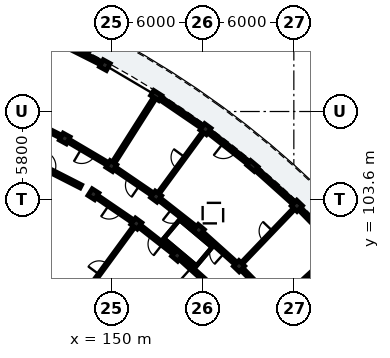
"""IFC4 building model, lengths in metres.
Left out: names, types, materials, properties, quantities, classifications, styles, units other than length and angle.
Written with IfcOpenShell. Run it as: python <this file> out.ifc"""

import sys

from ifc_helpers import new_model, si_unit, direction, frame, frame_2d, origin, origin_2d, place, context, subcontext, project, spatial, rectangle, extrude, element, fill, save


model = new_model("IFC4")
c1 = context("Model", 3, precision=1e-05, world=origin(), true_north=direction((0.0, 1.0)))
c2 = subcontext(c1, "Body", "Model", "MODEL_VIEW")
j1 = project(units=[si_unit("LENGTHUNIT", "METRE"), si_unit("PLANEANGLEUNIT", "RADIAN")], contexts=[c1])
p1 = place(None, origin())
s1 = spatial("IfcSite", under=j1, at=p1, CompositionType="ELEMENT")
p2 = place(p1, origin())
s2 = spatial("IfcBuilding", under=s1, at=p2, CompositionType="ELEMENT")
p3 = place(p2, frame((0.0, 0.0, 42.44)))
s3 = spatial("IfcBuildingStorey", under=s2, at=p3, CompositionType="ELEMENT", Elevation=42.44)
for number, where, z_axis, x_axis in (
    (1, (158.395, 99.226, 0.0), (0.0, 0.0, 1.0), (0.692, 0.722, 0.0)),
    (2, (162.2, 103.197, 0.0), (0.0, 0.0, 1.0), (0.692, 0.722, 0.0)),
    (3, (154.329, 99.919, 0.0), (0.0, 0.0, 1.0), (0.643, 0.766, 0.0)),
    (4, (155.743, 101.605, 0.0), (0.0, 0.0, 1.0), (0.643, 0.766, 0.0)),
):
    element("IfcColumn", number, at=place(p3, frame(where, z_axis=z_axis, x_axis=x_axis)), inside=s3, PredefinedType="COLUMN", context=c2, shape_type="SweptSolid", body=[
        extrude(rectangle(XDim=0.52, YDim=0.52, at=origin_2d()), origin(), (0.0, 0.0, 1.0), 3.1),
    ])
p4 = place(p3, frame((159.278, 105.818, 0.0), z_axis=(0.0, 0.0, 1.0), x_axis=(0.642787582947, 0.766044465556, 0.0)))
e5 = element("IfcColumn", 5, at=p4, inside=s3, PredefinedType="PILASTER", context=c2, shape_type="SweptSolid", body=[
    extrude(rectangle(XDim=0.39, YDim=0.63, at=origin_2d()), origin(), (0.0, 0.0, 1.0), 3.1),
])
for number, where, z_axis, x_axis in (
    (6, (151.639, 102.029, 0.0), (0.0, 0.0, 1.0), (0.591, 0.807, 0.0)),
    (7, (152.939, 103.804, 0.0), (0.0, 0.0, 1.0), (0.591, 0.807, 0.0)),
    (8, (156.189, 108.241, 0.0), (0.0, 0.0, 1.0), (0.591, 0.807, 0.0)),
    (9, (148.817, 103.957, 0.0), (0.0, 0.0, 1.0), (0.536, 0.844, 0.0)),
    (10, (149.997, 105.813, 0.0), (0.0, 0.0, 1.0), (0.536, 0.844, 0.0)),
):
    element("IfcColumn", number, at=place(p3, frame(where, z_axis=z_axis, x_axis=x_axis)), inside=s3, PredefinedType="COLUMN", context=c2, shape_type="SweptSolid", body=[
        extrude(rectangle(XDim=0.52, YDim=0.52, at=origin_2d()), origin(), (0.0, 0.0, 1.0), 3.1),
    ])
p5 = place(p3, frame((152.948, 110.455, 0.0), z_axis=(0.0, 0.0, 1.0), x_axis=(0.536481544469, 0.843912052553, 0.0)))
e11 = element("IfcColumn", 11, at=p5, inside=s3, PredefinedType="PILASTER", context=c2, shape_type="SweptSolid", body=[
    extrude(rectangle(XDim=0.39, YDim=0.63, at=origin_2d()), origin(), (0.0, 0.0, 1.0), 3.1),
])
for number, where, z_axis, x_axis in (
    (12, (146.928, 107.625, 0.0), (0.0, 0.0, 1.0), (0.48, 0.877, 0.0)),
    (13, (149.567, 112.451, 0.0), (0.0, 0.0, 1.0), (0.48, 0.877, 0.0)),
):
    element("IfcColumn", number, at=place(p3, frame(where, z_axis=z_axis, x_axis=x_axis)), inside=s3, PredefinedType="COLUMN", context=c2, shape_type="SweptSolid", body=[
        extrude(rectangle(XDim=0.52, YDim=0.52, at=origin_2d()), origin(), (0.0, 0.0, 1.0), 3.1),
    ])
p6 = place(p3, frame((164.829, 100.507, 0.0), z_axis=(0.0, 0.0, 1.0), x_axis=(-0.698865423919, 0.715253185418, 0.0)))
e14 = element("IfcWall", 14, at=p6, inside=s3, PredefinedType="SOLIDWALL", context=c2, shape_type="SweptSolid", body=[
    extrude(rectangle(XDim=3.531, YDim=0.22, at=frame_2d((1.765, 0.0))), origin(), (0.0, 0.0, 1.0), 2.355),
])
p7 = place(p6, frame((1.14, 0.0, 0.55)))
e15 = element("IfcOpeningElement", 15, at=p7, cuts=e14, PredefinedType="OPENING", context=c2, shape_type="SweptSolid", body=[
    extrude(rectangle(XDim=1.25, YDim=1.6, at=frame_2d((0.625, 0.8))), frame((0.0, 0.12, 0.0), z_axis=(0.0, -1.0, 0.0), x_axis=(1.0, 0.0, 0.0)), (0.0, 0.0, 1.0), 0.24),
])
p8 = place(p3, frame((162.029, 103.35, 0.0), z_axis=(0.0, 0.0, 1.0), x_axis=(-0.744441433528, 0.667687765386, 0.0)))
e16 = element("IfcWall", 16, at=p8, inside=s3, PredefinedType="SOLIDWALL", context=c2, shape_type="SweptSolid", body=[
    extrude(rectangle(XDim=3.531, YDim=0.22, at=frame_2d((1.765, 0.0))), origin(), (0.0, 0.0, 1.0), 2.355),
])
p9 = place(p8, frame((1.065, 0.0, 0.35)))
e17 = element("IfcOpeningElement", 17, at=p9, cuts=e16, PredefinedType="OPENING", context=c2, shape_type="SweptSolid", body=[
    extrude(rectangle(XDim=1.4, YDim=1.65, at=frame_2d((0.7, 0.825))), frame((0.0, 0.12, 0.0), z_axis=(0.0, -1.0, 0.0), x_axis=(1.0, 0.0, 0.0)), (0.0, 0.0, 1.0), 0.24),
])
p10 = place(p3, frame((159.148, 105.92, 0.0), z_axis=(0.0, 0.0, 1.0), x_axis=(-0.786809962682, 0.617195335873, 0.0)))
e18 = element("IfcWall", 18, at=p10, inside=s3, PredefinedType="SOLIDWALL", context=c2, shape_type="SweptSolid", body=[
    extrude(rectangle(XDim=3.531, YDim=0.22, at=frame_2d((1.765, 0.0))), origin(), (0.0, 0.0, 1.0), 2.355),
])
p11 = place(p10, frame((1.255, 0.0, 0.0)))
e19 = element("IfcOpeningElement", 19, at=p11, cuts=e18, PredefinedType="OPENING", context=c2, shape_type="SweptSolid", body=[
    extrude(rectangle(XDim=1.02, YDim=2.14, at=frame_2d((0.51, 1.07))), frame((0.0, 0.12, 0.0), z_axis=(0.0, -1.0, 0.0), x_axis=(1.0, 0.0, 0.0)), (0.0, 0.0, 1.0), 0.24),
])
p12 = place(p3, frame((155.999, 108.371, 0.0), z_axis=(0.0, 0.0, 1.0), x_axis=(-0.825785272096, 0.563984649072, 0.0)))
e20 = element("IfcWall", 20, at=p12, inside=s3, PredefinedType="SOLIDWALL", context=c2, shape_type="SweptSolid", body=[
    extrude(rectangle(XDim=3.531, YDim=0.22, at=frame_2d((1.765, 0.0))), origin(), (0.0, 0.0, 1.0), 2.355),
])
p13 = place(p12, frame((0.915, 0.0, 0.35)))
e21 = element("IfcOpeningElement", 21, at=p13, cuts=e20, PredefinedType="OPENING", context=c2, shape_type="SweptSolid", body=[
    extrude(rectangle(XDim=1.7, YDim=1.8, at=frame_2d((0.85, 0.9))), frame((0.0, 0.12, 0.0), z_axis=(0.0, -1.0, 0.0), x_axis=(1.0, 0.0, 0.0)), (0.0, 0.0, 1.0), 0.24),
])
p14 = place(p3, frame((149.362, 112.554, 0.0), z_axis=(0.0, 0.0, 1.0), x_axis=(-0.892747589921, 0.450557144755, 0.0)))
e22 = element("IfcWall", 22, at=p14, inside=s3, PredefinedType="SOLIDWALL", context=c2, shape_type="SweptSolid", body=[
    extrude(rectangle(XDim=3.531, YDim=0.22, at=frame_2d((1.765, 0.0))), origin(), (0.0, 0.0, 1.0), 2.355),
])
p15 = place(p14, frame((1.075, 0.0, 0.55)))
e23 = element("IfcOpeningElement", 23, at=p15, cuts=e22, PredefinedType="OPENING", context=c2, shape_type="SweptSolid", body=[
    extrude(rectangle(XDim=1.38, YDim=1.56, at=frame_2d((0.69, 0.78))), frame((0.0, 0.12, 0.0), z_axis=(0.0, -1.0, 0.0), x_axis=(1.0, 0.0, 0.0)), (0.0, 0.0, 1.0), 0.24),
])
p16 = place(p3, frame((143.625, 106.696, 0.0), z_axis=(0.0, 0.0, 1.0), x_axis=(0.891003372311, -0.453996685595, 0.0)))
e24 = element("IfcWall", 24, at=p16, inside=s3, PredefinedType="PARTITIONING", context=c2, shape_type="SweptSolid", body=[
    extrude(rectangle(XDim=4.9, YDim=0.22, at=frame_2d((2.45, 0.0))), origin(), (0.0, 0.0, 1.0), 2.34),
])
p17 = place(p16, frame((1.95, 0.0, 0.0)))
e25 = element("IfcOpeningElement", 25, at=p17, cuts=e24, PredefinedType="OPENING", context=c2, shape_type="SweptSolid", body=[
    extrude(rectangle(XDim=0.98, YDim=2.14, at=frame_2d((0.49, 1.07))), frame((0.0, 0.12, 0.0), z_axis=(0.0, -1.0, 0.0), x_axis=(1.0, 0.0, 0.0)), (0.0, 0.0, 1.0), 0.24),
])
p18 = place(p3, frame((161.18, 96.947, 0.0), z_axis=(0.0, 0.0, 1.0), x_axis=(0.737934199263, 0.674872667663, 0.0)))
e26 = element("IfcWall", 26, at=p18, inside=s3, PredefinedType="PARTITIONING", context=c2, shape_type="SweptSolid", body=[
    extrude(rectangle(XDim=4.7, YDim=0.185, at=frame_2d((2.35, 0.0))), origin(), (0.0, 0.0, 1.0), 2.37),
])
p19 = place(p3, frame((160.641, 96.927, 0.0), z_axis=(0.0, 0.0, 1.0), x_axis=(-0.698787219683, 0.715329589496, 0.0)))
e27 = element("IfcWall", 27, at=p19, inside=s3, PredefinedType="PARTITIONING", context=c2, shape_type="SweptSolid", body=[
    extrude(rectangle(XDim=2.863, YDim=0.205, at=frame_2d((1.432, 0.0))), origin(), (0.0, 0.0, 1.0), 2.37),
])
p20 = place(p19, frame((0.937, 0.0, 0.0)))
e28 = element("IfcOpeningElement", 28, at=p20, cuts=e27, PredefinedType="OPENING", context=c2, shape_type="SweptSolid", body=[
    extrude(rectangle(XDim=0.99, YDim=2.16, at=frame_2d((0.495, 1.08))), frame((0.0, 0.113, 0.0), z_axis=(0.0, -1.0, 0.0), x_axis=(1.0, 0.0, 0.0)), (0.0, 0.0, 1.0), 0.225),
])
p21 = place(p3, frame((158.672, 99.514, 0.0), z_axis=(0.0, 0.0, 1.0), x_axis=(0.691855720025, 0.722035776585, 0.0)))
e29 = element("IfcWall", 29, at=p21, inside=s3, PredefinedType="PARTITIONING", context=c2, shape_type="SweptSolid", body=[
    extrude(rectangle(XDim=4.7, YDim=0.125, at=frame_2d((2.35, 0.0))), origin(), (0.0, 0.0, 1.0), 2.37),
])
p22 = place(p21, frame((1.905, 0.0, 0.0)))
e30 = element("IfcOpeningElement", 30, at=p22, cuts=e29, PredefinedType="OPENING", context=c2, shape_type="SweptSolid", body=[
    extrude(rectangle(XDim=0.89, YDim=2.1, at=frame_2d((0.445, 1.05))), frame((0.0, 0.073, 0.0), z_axis=(0.0, -1.0, 0.0), x_axis=(1.0, 0.0, 0.0)), (0.0, 0.0, 1.0), 0.145),
])
p23 = place(p3, frame((158.135, 99.459, 0.0), z_axis=(0.0, 0.0, 1.0), x_axis=(-0.744433521088, 0.667696587291, 0.0)))
e31 = element("IfcWall", 31, at=p23, inside=s3, PredefinedType="PARTITIONING", context=c2, shape_type="SweptSolid", body=[
    extrude(rectangle(XDim=2.863, YDim=0.205, at=frame_2d((1.432, 0.0))), origin(), (0.0, 0.0, 1.0), 2.37),
])
p24 = place(p23, frame((0.947, 0.0, 0.0)))
e32 = element("IfcOpeningElement", 32, at=p24, cuts=e31, PredefinedType="OPENING", context=c2, shape_type="SweptSolid", body=[
    extrude(rectangle(XDim=0.97, YDim=2.15, at=frame_2d((0.485, 1.075))), frame((0.0, 0.113, 0.0), z_axis=(0.0, -1.0, 0.0), x_axis=(1.0, 0.0, 0.0)), (0.0, 0.0, 1.0), 0.225),
])
p25 = place(p3, frame((156.613, 97.871, 0.0), z_axis=(0.0, 0.0, 1.0), x_axis=(-0.744418559135, 0.667713268413, 0.0)))
e33 = element("IfcWall", 33, at=p25, inside=s3, PredefinedType="PARTITIONING", context=c2, shape_type="SweptSolid", body=[
    extrude(rectangle(XDim=2.718, YDim=0.205, at=frame_2d((1.359, 0.0))), origin(), (0.0, 0.0, 1.0), 2.37),
])
p26 = place(p25, frame((0.874, 0.0, 0.0)))
e34 = element("IfcOpeningElement", 34, at=p26, cuts=e33, PredefinedType="OPENING", context=c2, shape_type="SweptSolid", body=[
    extrude(rectangle(XDim=0.97, YDim=2.15, at=frame_2d((0.485, 1.075))), frame((0.0, 0.113, 0.0), z_axis=(0.0, -1.0, 0.0), x_axis=(1.0, 0.0, 0.0)), (0.0, 0.0, 1.0), 0.225),
])
p27 = place(p3, frame((155.467, 101.821, 0.0), z_axis=(0.0, 0.0, 1.0), x_axis=(-0.786806323554, 0.617199975061, 0.0)))
e35 = element("IfcWall", 35, at=p27, inside=s3, PredefinedType="PARTITIONING", context=c2, shape_type="SweptSolid", body=[
    extrude(rectangle(XDim=2.863, YDim=0.205, at=frame_2d((1.432, 0.0))), origin(), (0.0, 0.0, 1.0), 2.37),
])
p28 = place(p27, frame((0.957, 0.0, 0.0)))
e36 = element("IfcOpeningElement", 36, at=p28, cuts=e35, PredefinedType="OPENING", context=c2, shape_type="SweptSolid", body=[
    extrude(rectangle(XDim=0.95, YDim=2.13, at=frame_2d((0.475, 1.065))), frame((0.0, 0.113, 0.0), z_axis=(0.0, -1.0, 0.0), x_axis=(1.0, 0.0, 0.0)), (0.0, 0.0, 1.0), 0.225),
])
p29 = place(p3, frame((154.053, 100.135, 0.0), z_axis=(0.0, 0.0, 1.0), x_axis=(-0.786835457019, 0.617162833924, 0.0)))
e37 = element("IfcWall", 37, at=p29, inside=s3, PredefinedType="PARTITIONING", context=c2, shape_type="SweptSolid", body=[
    extrude(rectangle(XDim=2.718, YDim=0.205, at=frame_2d((1.359, 0.0))), origin(), (0.0, 0.0, 1.0), 2.37),
])
p30 = place(p29, frame((0.884, 0.0, 0.0)))
e38 = element("IfcOpeningElement", 38, at=p30, cuts=e37, PredefinedType="OPENING", context=c2, shape_type="SweptSolid", body=[
    extrude(rectangle(XDim=0.95, YDim=2.13, at=frame_2d((0.475, 1.065))), frame((0.0, 0.113, 0.0), z_axis=(0.0, -1.0, 0.0), x_axis=(1.0, 0.0, 0.0)), (0.0, 0.0, 1.0), 0.225),
])
p31 = place(p3, frame((153.176, 104.126, 0.0), z_axis=(0.0, 0.0, 1.0), x_axis=(0.590910940129, 0.806736797745, 0.0)))
e39 = element("IfcWall", 39, at=p31, inside=s3, PredefinedType="PARTITIONING", context=c2, shape_type="SweptSolid", body=[
    extrude(rectangle(XDim=4.7, YDim=0.125, at=frame_2d((2.35, 0.0))), origin(), (0.0, 0.0, 1.0), 2.37),
])
p32 = place(p31, frame((1.895, 0.0, 0.0)))
e40 = element("IfcOpeningElement", 40, at=p32, cuts=e39, PredefinedType="OPENING", context=c2, shape_type="SweptSolid", body=[
    extrude(rectangle(XDim=0.91, YDim=2.1, at=frame_2d((0.455, 1.05))), frame((0.0, 0.073, 0.0), z_axis=(0.0, -1.0, 0.0), x_axis=(1.0, 0.0, 0.0)), (0.0, 0.0, 1.0), 0.145),
])
p33 = place(p3, frame((147.503, 96.382, 0.0), z_axis=(0.0, 0.0, 1.0), x_axis=(0.590924179316, 0.806727100263, 0.0)))
e41 = element("IfcWall", 41, at=p33, inside=s3, PredefinedType="PARTITIONING", context=c2, shape_type="SweptSolid", body=[
    extrude(rectangle(XDim=6.6, YDim=0.125, at=frame_2d((3.3, 0.0))), origin(), (0.0, 0.0, 1.0), 2.37),
])
p34 = place(p33, frame((2.855, 0.0, 0.0)))
e42 = element("IfcOpeningElement", 42, at=p34, cuts=e41, PredefinedType="OPENING", context=c2, shape_type="SweptSolid", body=[
    extrude(rectangle(XDim=0.89, YDim=2.1, at=frame_2d((0.445, 1.05))), frame((0.0, 0.073, 0.0), z_axis=(0.0, -1.0, 0.0), x_axis=(1.0, 0.0, 0.0)), (0.0, 0.0, 1.0), 0.145),
])
p35 = place(p3, frame((152.65, 104.001, 0.0), z_axis=(0.0, 0.0, 1.0), x_axis=(-0.825779671787, 0.563992848947, 0.0)))
e43 = element("IfcWall", 43, at=p35, inside=s3, PredefinedType="PARTITIONING", context=c2, shape_type="SweptSolid", body=[
    extrude(rectangle(XDim=2.863, YDim=0.205, at=frame_2d((1.432, 0.0))), origin(), (0.0, 0.0, 1.0), 2.37),
])
p36 = place(p35, frame((0.967, 0.0, 0.0)))
e44 = element("IfcOpeningElement", 44, at=p36, cuts=e43, PredefinedType="OPENING", context=c2, shape_type="SweptSolid", body=[
    extrude(rectangle(XDim=0.93, YDim=2.12, at=frame_2d((0.465, 1.06))), frame((0.0, 0.113, 0.0), z_axis=(0.0, -1.0, 0.0), x_axis=(1.0, 0.0, 0.0)), (0.0, 0.0, 1.0), 0.225),
])
p37 = place(p3, frame((151.35, 102.226, 0.0), z_axis=(0.0, 0.0, 1.0), x_axis=(-0.825752009056, 0.56403334967, 0.0)))
e45 = element("IfcWall", 45, at=p37, inside=s3, PredefinedType="PARTITIONING", context=c2, shape_type="SweptSolid", body=[
    extrude(rectangle(XDim=2.718, YDim=0.205, at=frame_2d((1.359, 0.0))), origin(), (0.0, 0.0, 1.0), 2.37),
])
p38 = place(p37, frame((0.894, 0.0, 0.0)))
e46 = element("IfcOpeningElement", 46, at=p38, cuts=e45, PredefinedType="OPENING", context=c2, shape_type="SweptSolid", body=[
    extrude(rectangle(XDim=0.93, YDim=2.12, at=frame_2d((0.465, 1.06))), frame((0.0, 0.113, 0.0), z_axis=(0.0, -1.0, 0.0), x_axis=(1.0, 0.0, 0.0)), (0.0, 0.0, 1.0), 0.225),
])
p39 = place(p3, frame((150.211, 106.151, 0.0), z_axis=(0.0, 0.0, 1.0), x_axis=(0.536492262982, 0.843905238614, 0.0)))
e47 = element("IfcWall", 47, at=p39, inside=s3, PredefinedType="PARTITIONING", context=c2, shape_type="SweptSolid", body=[
    extrude(rectangle(XDim=4.7, YDim=0.185, at=frame_2d((2.35, 0.0))), origin(), (0.0, 0.0, 1.0), 2.37),
])
p40 = place(p3, frame((149.695, 105.991, 0.0), z_axis=(0.0, 0.0, 1.0), x_axis=(-0.861113214678, 0.508413248753, 0.0)))
e48 = element("IfcWall", 48, at=p40, inside=s3, PredefinedType="PARTITIONING", context=c2, shape_type="SweptSolid", body=[
    extrude(rectangle(XDim=2.863, YDim=0.205, at=frame_2d((1.432, 0.0))), origin(), (0.0, 0.0, 1.0), 2.37),
])
p41 = place(p40, frame((0.937, 0.0, 0.0)))
e49 = element("IfcOpeningElement", 49, at=p41, cuts=e48, PredefinedType="OPENING", context=c2, shape_type="SweptSolid", body=[
    extrude(rectangle(XDim=0.99, YDim=2.16, at=frame_2d((0.495, 1.08))), frame((0.0, 0.113, 0.0), z_axis=(0.0, -1.0, 0.0), x_axis=(1.0, 0.0, 0.0)), (0.0, 0.0, 1.0), 0.225),
])
p42 = place(p3, frame((146.616, 107.782, 0.0), z_axis=(0.0, 0.0, 1.0), x_axis=(-0.89273239336, 0.450587254419, 0.0)))
e50 = element("IfcWall", 50, at=p42, inside=s3, PredefinedType="PARTITIONING", context=c2, shape_type="SweptSolid", body=[
    extrude(rectangle(XDim=2.863, YDim=0.205, at=frame_2d((1.432, 0.0))), origin(), (0.0, 0.0, 1.0), 2.37),
])
p43 = place(p42, frame((0.947, 0.0, 0.0)))
e51 = element("IfcOpeningElement", 51, at=p43, cuts=e50, PredefinedType="OPENING", context=c2, shape_type="SweptSolid", body=[
    extrude(rectangle(XDim=0.97, YDim=2.15, at=frame_2d((0.485, 1.075))), frame((0.0, 0.113, 0.0), z_axis=(0.0, -1.0, 0.0), x_axis=(1.0, 0.0, 0.0)), (0.0, 0.0, 1.0), 0.225),
])
p44 = place(p9, origin())
e52 = element("IfcWindow", 52, at=p44, inside=s3, PartitioningType="SINGLE_PANEL", PredefinedType="WINDOW", context=c2, shape_type="SweptSolid", body=[
    extrude(rectangle(XDim=1.4, YDim=1.65, at=frame_2d((0.7, 0.825))), frame((0.0, 0.03, 0.0), z_axis=(0.0, -1.0, 0.0), x_axis=(1.0, 0.0, 0.0)), (0.0, 0.0, 1.0), 0.06),
])
fill(e17, e52)
p45 = place(p11, origin())
e53 = element("IfcDoor", 53, at=p45, inside=s3, OperationType="SINGLE_SWING_RIGHT", PredefinedType="DOOR", context=c2, shape_type="SweptSolid", body=[
    extrude(rectangle(XDim=1.02, YDim=2.14, at=frame_2d((0.51, 1.07))), frame((0.0, 0.025, 0.0), z_axis=(0.0, -1.0, 0.0), x_axis=(1.0, 0.0, 0.0)), (0.0, 0.0, 1.0), 0.05),
])
fill(e19, e53)
p46 = place(p13, origin())
e54 = element("IfcWindow", 54, at=p46, inside=s3, PartitioningType="SINGLE_PANEL", PredefinedType="WINDOW", context=c2, shape_type="SweptSolid", body=[
    extrude(rectangle(XDim=1.7, YDim=1.8, at=frame_2d((0.85, 0.9))), frame((0.0, 0.03, 0.0), z_axis=(0.0, -1.0, 0.0), x_axis=(1.0, 0.0, 0.0)), (0.0, 0.0, 1.0), 0.06),
])
fill(e21, e54)
p47 = place(p15, origin())
e55 = element("IfcWindow", 55, at=p47, inside=s3, PartitioningType="SINGLE_PANEL", PredefinedType="WINDOW", context=c2, shape_type="SweptSolid", body=[
    extrude(rectangle(XDim=1.38, YDim=1.56, at=frame_2d((0.69, 0.78))), frame((0.0, 0.03, 0.0), z_axis=(0.0, -1.0, 0.0), x_axis=(1.0, 0.0, 0.0)), (0.0, 0.0, 1.0), 0.06),
])
fill(e23, e55)
p48 = place(p2, frame((0.0, 0.0, 45.8)))
p49 = place(p48, frame((0.0, 0.0, -0.26)))
p50 = place(p49, frame((156.675, 102.716, 0.21)))
e56 = element("IfcWindow", 56, at=p50, inside=s3, PartitioningType="SINGLE_PANEL", PredefinedType="SKYLIGHT", context=c2, shape_type="SweptSolid", body=[
    extrude(rectangle(XDim=1.35, YDim=1.35, at=origin_2d()), origin(), (0.0, 0.0, 1.0), 0.05),
])
p51 = place(p17, origin())
e57 = element("IfcDoor", 57, at=p51, inside=s3, OperationType="SINGLE_SWING_LEFT", PredefinedType="DOOR", context=c2, shape_type="SweptSolid", body=[
    extrude(rectangle(XDim=0.98, YDim=2.14, at=frame_2d((0.49, 1.07))), frame((0.0, 0.025, 0.0), z_axis=(0.0, -1.0, 0.0), x_axis=(1.0, 0.0, 0.0)), (0.0, 0.0, 1.0), 0.05),
])
fill(e25, e57)
p52 = place(p22, origin())
e58 = element("IfcDoor", 58, at=p52, inside=s3, OperationType="SINGLE_SWING_RIGHT", PredefinedType="DOOR", context=c2, shape_type="SweptSolid", body=[
    extrude(rectangle(XDim=0.89, YDim=2.1, at=frame_2d((0.445, 1.05))), frame((0.0, 0.025, 0.0), z_axis=(0.0, -1.0, 0.0), x_axis=(1.0, 0.0, 0.0)), (0.0, 0.0, 1.0), 0.05),
])
fill(e30, e58)
p53 = place(p24, origin())
e59 = element("IfcDoor", 59, at=p53, inside=s3, OperationType="SINGLE_SWING_LEFT", PredefinedType="DOOR", context=c2, shape_type="SweptSolid", body=[
    extrude(rectangle(XDim=0.97, YDim=2.15, at=frame_2d((0.485, 1.075))), frame((0.0, 0.025, 0.0), z_axis=(0.0, -1.0, 0.0), x_axis=(1.0, 0.0, 0.0)), (0.0, 0.0, 1.0), 0.05),
])
fill(e32, e59)
p54 = place(p26, origin())
e60 = element("IfcDoor", 60, at=p54, inside=s3, OperationType="SINGLE_SWING_RIGHT", PredefinedType="DOOR", context=c2, shape_type="SweptSolid", body=[
    extrude(rectangle(XDim=0.97, YDim=2.15, at=frame_2d((0.485, 1.075))), frame((0.0, 0.025, 0.0), z_axis=(0.0, -1.0, 0.0), x_axis=(1.0, 0.0, 0.0)), (0.0, 0.0, 1.0), 0.05),
])
fill(e34, e60)
p55 = place(p28, origin())
e61 = element("IfcDoor", 61, at=p55, inside=s3, OperationType="SINGLE_SWING_RIGHT", PredefinedType="DOOR", context=c2, shape_type="SweptSolid", body=[
    extrude(rectangle(XDim=0.95, YDim=2.13, at=frame_2d((0.475, 1.065))), frame((0.0, 0.025, 0.0), z_axis=(0.0, -1.0, 0.0), x_axis=(1.0, 0.0, 0.0)), (0.0, 0.0, 1.0), 0.05),
])
fill(e36, e61)
p56 = place(p30, origin())
e62 = element("IfcDoor", 62, at=p56, inside=s3, OperationType="SINGLE_SWING_LEFT", PredefinedType="DOOR", context=c2, shape_type="SweptSolid", body=[
    extrude(rectangle(XDim=0.95, YDim=2.13, at=frame_2d((0.475, 1.065))), frame((0.0, 0.025, 0.0), z_axis=(0.0, -1.0, 0.0), x_axis=(1.0, 0.0, 0.0)), (0.0, 0.0, 1.0), 0.05),
])
fill(e38, e62)
p57 = place(p32, origin())
e63 = element("IfcDoor", 63, at=p57, inside=s3, OperationType="SINGLE_SWING_RIGHT", PredefinedType="DOOR", context=c2, shape_type="SweptSolid", body=[
    extrude(rectangle(XDim=0.91, YDim=2.1, at=frame_2d((0.455, 1.05))), frame((0.0, 0.025, 0.0), z_axis=(0.0, -1.0, 0.0), x_axis=(1.0, 0.0, 0.0)), (0.0, 0.0, 1.0), 0.05),
])
fill(e40, e63)
p58 = place(p34, origin())
e64 = element("IfcDoor", 64, at=p58, inside=s3, OperationType="SINGLE_SWING_LEFT", PredefinedType="DOOR", context=c2, shape_type="SweptSolid", body=[
    extrude(rectangle(XDim=0.89, YDim=2.1, at=frame_2d((0.445, 1.05))), frame((0.0, 0.025, 0.0), z_axis=(0.0, -1.0, 0.0), x_axis=(1.0, 0.0, 0.0)), (0.0, 0.0, 1.0), 0.05),
])
fill(e42, e64)
p59 = place(p36, origin())
e65 = element("IfcDoor", 65, at=p59, inside=s3, OperationType="SINGLE_SWING_LEFT", PredefinedType="DOOR", context=c2, shape_type="SweptSolid", body=[
    extrude(rectangle(XDim=0.93, YDim=2.12, at=frame_2d((0.465, 1.06))), frame((0.0, 0.025, 0.0), z_axis=(0.0, -1.0, 0.0), x_axis=(1.0, 0.0, 0.0)), (0.0, 0.0, 1.0), 0.05),
])
fill(e44, e65)
p60 = place(p38, origin())
e66 = element("IfcDoor", 66, at=p60, inside=s3, OperationType="SINGLE_SWING_RIGHT", PredefinedType="DOOR", context=c2, shape_type="SweptSolid", body=[
    extrude(rectangle(XDim=0.93, YDim=2.12, at=frame_2d((0.465, 1.06))), frame((0.0, 0.025, 0.0), z_axis=(0.0, -1.0, 0.0), x_axis=(1.0, 0.0, 0.0)), (0.0, 0.0, 1.0), 0.05),
])
fill(e46, e66)
p61 = place(p41, origin())
e67 = element("IfcDoor", 67, at=p61, inside=s3, OperationType="SINGLE_SWING_RIGHT", PredefinedType="DOOR", context=c2, shape_type="SweptSolid", body=[
    extrude(rectangle(XDim=0.99, YDim=2.16, at=frame_2d((0.495, 1.08))), frame((0.0, 0.025, 0.0), z_axis=(0.0, -1.0, 0.0), x_axis=(1.0, 0.0, 0.0)), (0.0, 0.0, 1.0), 0.05),
])
fill(e49, e67)
save(model, sys.argv[1])
